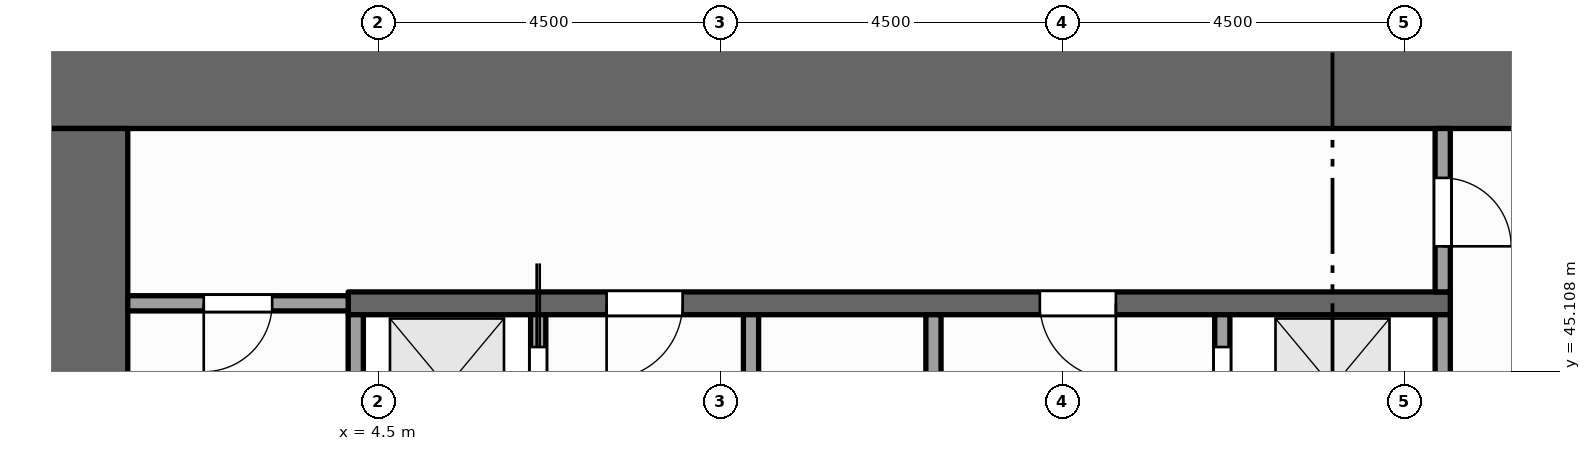
"""IFC4 building model, lengths in metres.
Left out: names, types, materials, properties, quantities, classifications, styles, units other than length and angle.
Written with IfcOpenShell. Run it as: python <this file> out.ifc"""

import sys

from ifc_helpers import new_model, si_unit, direction, frame, frame_2d, origin, place, context, subcontext, project, spatial, rectangle, extrude, element, fill, save


model = new_model("IFC4")
c1 = context("Model", 3, precision=1e-05, world=origin(), true_north=direction((0.0, 1.0)))
c2 = subcontext(c1, "Body", "Model", "MODEL_VIEW")
j1 = project(units=[si_unit("LENGTHUNIT", "METRE"), si_unit("PLANEANGLEUNIT", "RADIAN")], contexts=[c1])
p1 = place(None, origin())
s1 = spatial("IfcSite", under=j1, at=p1, CompositionType="ELEMENT")
p2 = place(p1, origin())
s2 = spatial("IfcBuilding", under=s1, at=p2, CompositionType="ELEMENT")
p3 = place(p2, frame((0.0, 0.0, 14.0)))
s3 = spatial("IfcBuildingStorey", under=s2, at=p3, CompositionType="ELEMENT", Elevation=14.0)
p4 = place(p3, frame((0.0, 48.9, -0.15), z_axis=(0.0, 0.0, 1.0), x_axis=(1.0, 0.0, 0.0)))
e1 = element("IfcWall", 1, at=p4, inside=s3, PredefinedType="SHEAR", context=c2, shape_type="SweptSolid", body=[
    extrude(rectangle(XDim=22.5, YDim=1.2, at=frame_2d((11.25, 0.0))), origin(), (0.0, 0.0, 1.0), 5.0),
])
p5 = place(p3, frame((0.6, 37.2, -0.15), z_axis=(0.0, 0.0, 1.0), x_axis=(0.0, 1.0, 0.0)))
e2 = element("IfcWall", 2, at=p5, inside=s3, PredefinedType="SHEAR", context=c2, shape_type="SweptSolid", body=[
    extrude(rectangle(XDim=11.1, YDim=1.2, at=frame_2d((5.55, 0.0))), origin(), (0.0, 0.0, 1.0), 5.0),
])
p6 = place(p3, frame((4.2, 43.525, 0.0), z_axis=(0.0, 0.0, 1.0), x_axis=(0.0, 1.0, 0.0)))
e3 = element("IfcWall", 3, at=p6, inside=s3, PredefinedType="SOLIDWALL", context=c2, shape_type="SweptSolid", body=[
    extrude(rectangle(XDim=2.325, YDim=0.2, at=frame_2d((1.163, 0.0))), origin(), (0.0, 0.0, 1.0), 4.75),
])
p7 = place(p3, frame((6.6, 37.2, 0.0), z_axis=(0.0, 0.0, 1.0), x_axis=(0.0, 1.0, 0.0)))
e4 = element("IfcWall", 4, at=p7, inside=s3, PredefinedType="SOLIDWALL", context=c2, shape_type="SweptSolid", body=[
    extrude(rectangle(XDim=8.65, YDim=0.2, at=frame_2d((4.325, 0.0))), origin(), (0.0, 0.0, 1.0), 4.75),
])
p8 = place(p7, frame((0.5, 0.0, 0.012)))
e5 = element("IfcOpeningElement", 5, at=p8, cuts=e4, PredefinedType="OPENING", context=c2, shape_type="SweptSolid", body=[
    extrude(rectangle(XDim=1.1, YDim=2.1, at=frame_2d((0.55, 1.05))), frame((0.0, 0.11, 0.0), z_axis=(0.0, -1.0, 0.0), x_axis=(1.0, 0.0, 0.0)), (0.0, 0.0, 1.0), 0.22),
])
p9 = place(p7, frame((2.75, 0.0, 0.012)))
e6 = element("IfcOpeningElement", 6, at=p9, cuts=e4, PredefinedType="OPENING", context=c2, shape_type="SweptSolid", body=[
    extrude(rectangle(XDim=1.1, YDim=2.1, at=frame_2d((0.55, 1.05))), frame((0.0, 0.11, 0.0), z_axis=(0.0, -1.0, 0.0), x_axis=(1.0, 0.0, 0.0)), (0.0, 0.0, 1.0), 0.22),
])
p10 = place(p7, frame((4.95, 0.0, 0.012)))
e7 = element("IfcOpeningElement", 7, at=p10, cuts=e4, PredefinedType="OPENING", context=c2, shape_type="SweptSolid", body=[
    extrude(rectangle(XDim=1.1, YDim=2.1, at=frame_2d((0.55, 1.05))), frame((0.0, 0.11, 0.0), z_axis=(0.0, -1.0, 0.0), x_axis=(1.0, 0.0, 0.0)), (0.0, 0.0, 1.0), 0.22),
])
p11 = place(p7, frame((7.125, 0.0, 0.012)))
e8 = element("IfcOpeningElement", 8, at=p11, cuts=e4, PredefinedType="OPENING", context=c2, shape_type="SweptSolid", body=[
    extrude(rectangle(XDim=1.1, YDim=2.1, at=frame_2d((0.55, 1.05))), frame((0.0, 0.11, 0.0), z_axis=(0.0, -1.0, 0.0), x_axis=(1.0, 0.0, 0.0)), (0.0, 0.0, 1.0), 0.22),
])
p12 = place(p3, frame((9.4, 37.2, 0.0), z_axis=(0.0, 0.0, 1.0), x_axis=(0.0, 1.0, 0.0)))
e9 = element("IfcWall", 9, at=p12, inside=s3, PredefinedType="PARTITIONING", context=c2, shape_type="SweptSolid", body=[
    extrude(rectangle(XDim=8.65, YDim=0.2, at=frame_2d((4.325, 0.0))), origin(), (0.0, 0.0, 1.0), 4.75),
])
p13 = place(p12, frame((3.875, 0.0, 0.0)))
e10 = element("IfcOpeningElement", 10, at=p13, cuts=e9, PredefinedType="OPENING", context=c2, shape_type="SweptSolid", body=[
    extrude(rectangle(XDim=0.9, YDim=2.1, at=frame_2d((0.45, 1.05))), frame((0.0, 0.11, 0.0), z_axis=(0.0, -1.0, 0.0), x_axis=(1.0, 0.0, 0.0)), (0.0, 0.0, 1.0), 0.22),
])
p14 = place(p3, frame((11.8, 37.2, 0.0), z_axis=(0.0, 0.0, 1.0), x_axis=(0.0, 1.0, 0.0)))
e11 = element("IfcWall", 11, at=p14, inside=s3, PredefinedType="PARTITIONING", context=c2, shape_type="SweptSolid", body=[
    extrude(rectangle(XDim=8.65, YDim=0.2, at=frame_2d((4.325, 0.0))), origin(), (0.0, 0.0, 1.0), 4.75),
])
p15 = place(p3, frame((15.6, 43.7, 0.0), z_axis=(0.0, 0.0, 1.0), x_axis=(0.0, 1.0, 0.0)))
e12 = element("IfcWall", 12, at=p15, inside=s3, PredefinedType="SOLIDWALL", context=c2, shape_type="SweptSolid", body=[
    extrude(rectangle(XDim=2.15, YDim=0.2, at=frame_2d((1.075, 0.0))), origin(), (0.0, 0.0, 1.0), 4.75),
])
p16 = place(p15, frame((0.625, 0.0, 0.012)))
e13 = element("IfcOpeningElement", 13, at=p16, cuts=e12, PredefinedType="OPENING", context=c2, shape_type="SweptSolid", body=[
    extrude(rectangle(XDim=1.1, YDim=2.1, at=frame_2d((0.55, 1.05))), frame((0.0, 0.11, 0.0), z_axis=(0.0, -1.0, 0.0), x_axis=(1.0, 0.0, 0.0)), (0.0, 0.0, 1.0), 0.22),
])
p17 = place(p3, frame((18.5, 43.7, 0.0), z_axis=(0.0, 0.0, 1.0), x_axis=(0.0, 1.0, 0.0)))
e14 = element("IfcWall", 14, at=p17, inside=s3, PredefinedType="SOLIDWALL", context=c2, shape_type="SweptSolid", body=[
    extrude(rectangle(XDim=2.15, YDim=0.2, at=frame_2d((1.075, 0.0))), origin(), (0.0, 0.0, 1.0), 4.75),
])
p18 = place(p3, frame((18.5, 46.15, 0.0), z_axis=(0.0, 0.0, 1.0), x_axis=(0.0, 1.0, 0.0)))
e15 = element("IfcWall", 15, at=p18, inside=s3, PredefinedType="PARTITIONING", context=c2, shape_type="SweptSolid", body=[
    extrude(rectangle(XDim=2.15, YDim=0.2, at=frame_2d((1.075, 0.0))), origin(), (0.0, 0.0, 1.0), 4.75),
])
p19 = place(p18, frame((0.6, 0.0, 0.0)))
e16 = element("IfcOpeningElement", 16, at=p19, cuts=e15, PredefinedType="OPENING", context=c2, shape_type="SweptSolid", body=[
    extrude(rectangle(XDim=0.9, YDim=2.1, at=frame_2d((0.45, 1.05))), frame((0.0, 0.11, 0.0), z_axis=(0.0, -1.0, 0.0), x_axis=(1.0, 0.0, 0.0)), (0.0, 0.0, 1.0), 0.22),
])
p20 = place(p3, frame((1.2, 46.0, 0.0), z_axis=(0.0, 0.0, 1.0), x_axis=(1.0, 0.0, 0.0)))
e17 = element("IfcWall", 17, at=p20, inside=s3, PredefinedType="PARTITIONING", context=c2, shape_type="SweptSolid", body=[
    extrude(rectangle(XDim=2.9, YDim=0.2, at=frame_2d((1.45, 0.0))), origin(), (0.0, 0.0, 1.0), 4.75),
])
p21 = place(p20, frame((1.0, 0.0, 0.0)))
e18 = element("IfcOpeningElement", 18, at=p21, cuts=e17, PredefinedType="OPENING", context=c2, shape_type="SweptSolid", body=[
    extrude(rectangle(XDim=0.9, YDim=2.1, at=frame_2d((0.45, 1.05))), frame((0.0, 0.11, 0.0), z_axis=(0.0, -1.0, 0.0), x_axis=(1.0, 0.0, 0.0)), (0.0, 0.0, 1.0), 0.22),
])
p22 = place(p3, frame((4.1, 46.0, 0.0), z_axis=(0.0, 0.0, 1.0), x_axis=(1.0, 0.0, 0.0)))
e19 = element("IfcWall", 19, at=p22, inside=s3, PredefinedType="SHEAR", context=c2, shape_type="SweptSolid", body=[
    extrude(rectangle(XDim=14.5, YDim=0.3, at=frame_2d((7.25, 0.0))), origin(), (0.0, 0.0, 1.0), 4.75),
])
p23 = place(p22, frame((3.4, 0.0, 0.0)))
e20 = element("IfcOpeningElement", 20, at=p23, cuts=e19, PredefinedType="OPENING", context=c2, shape_type="SweptSolid", body=[
    extrude(rectangle(XDim=1.0, YDim=2.1, at=frame_2d((0.5, 1.05))), frame((0.0, 0.16, 0.0), z_axis=(0.0, -1.0, 0.0), x_axis=(1.0, 0.0, 0.0)), (0.0, 0.0, 1.0), 0.32),
])
p24 = place(p22, frame((9.1, 0.0, 0.0)))
e21 = element("IfcOpeningElement", 21, at=p24, cuts=e19, PredefinedType="OPENING", context=c2, shape_type="SweptSolid", body=[
    extrude(rectangle(XDim=1.0, YDim=2.1, at=frame_2d((0.5, 1.05))), frame((0.0, 0.16, 0.0), z_axis=(0.0, -1.0, 0.0), x_axis=(1.0, 0.0, 0.0)), (0.0, 0.0, 1.0), 0.32),
])
p25 = place(p11, origin())
e22 = element("IfcDoor", 22, at=p25, inside=s3, OperationType="SLIDING_TO_RIGHT", PredefinedType="DOOR", context=c2, shape_type="SweptSolid", body=[
    extrude(rectangle(XDim=1.1, YDim=2.1, at=frame_2d((0.55, 1.05))), frame((0.0, 0.025, 0.0), z_axis=(0.0, -1.0, 0.0), x_axis=(1.0, 0.0, 0.0)), (0.0, 0.0, 1.0), 0.05),
])
fill(e8, e22)
p26 = place(p16, origin())
e23 = element("IfcDoor", 23, at=p26, inside=s3, OperationType="SLIDING_TO_LEFT", PredefinedType="DOOR", context=c2, shape_type="SweptSolid", body=[
    extrude(rectangle(XDim=1.1, YDim=2.1, at=frame_2d((0.55, 1.05))), frame((0.0, 0.025, 0.0), z_axis=(0.0, -1.0, 0.0), x_axis=(1.0, 0.0, 0.0)), (0.0, 0.0, 1.0), 0.05),
])
fill(e13, e23)
p27 = place(p23, origin())
e24 = element("IfcDoor", 24, at=p27, inside=s3, OperationType="SINGLE_SWING_LEFT", PredefinedType="DOOR", context=c2, shape_type="SweptSolid", body=[
    extrude(rectangle(XDim=1.0, YDim=2.1, at=frame_2d((0.5, 1.05))), frame((0.0, 0.025, 0.0), z_axis=(0.0, -1.0, 0.0), x_axis=(1.0, 0.0, 0.0)), (0.0, 0.0, 1.0), 0.05),
])
fill(e20, e24)
p28 = place(p24, origin())
e25 = element("IfcDoor", 25, at=p28, inside=s3, OperationType="SINGLE_SWING_RIGHT", PredefinedType="DOOR", context=c2, shape_type="SweptSolid", body=[
    extrude(rectangle(XDim=1.0, YDim=2.1, at=frame_2d((0.5, 1.05))), frame((0.0, 0.025, 0.0), z_axis=(0.0, -1.0, 0.0), x_axis=(1.0, 0.0, 0.0)), (0.0, 0.0, 1.0), 0.05),
])
fill(e21, e25)
p29 = place(p21, origin())
e26 = element("IfcDoor", 26, at=p29, inside=s3, OperationType="SINGLE_SWING_LEFT", PredefinedType="DOOR", context=c2, shape_type="SweptSolid", body=[
    extrude(rectangle(XDim=0.9, YDim=2.1, at=frame_2d((0.45, 1.05))), frame((0.0, 0.025, 0.0), z_axis=(0.0, -1.0, 0.0), x_axis=(1.0, 0.0, 0.0)), (0.0, 0.0, 1.0), 0.05),
])
fill(e18, e26)
p30 = place(p19, origin())
e27 = element("IfcDoor", 27, at=p30, inside=s3, OperationType="SINGLE_SWING_LEFT", PredefinedType="DOOR", context=c2, shape_type="SweptSolid", body=[
    extrude(rectangle(XDim=0.9, YDim=2.1, at=frame_2d((0.45, 1.05))), frame((0.0, 0.025, 0.0), z_axis=(0.0, -1.0, 0.0), x_axis=(1.0, 0.0, 0.0)), (0.0, 0.0, 1.0), 0.05),
])
fill(e16, e27)
save(model, sys.argv[1])
